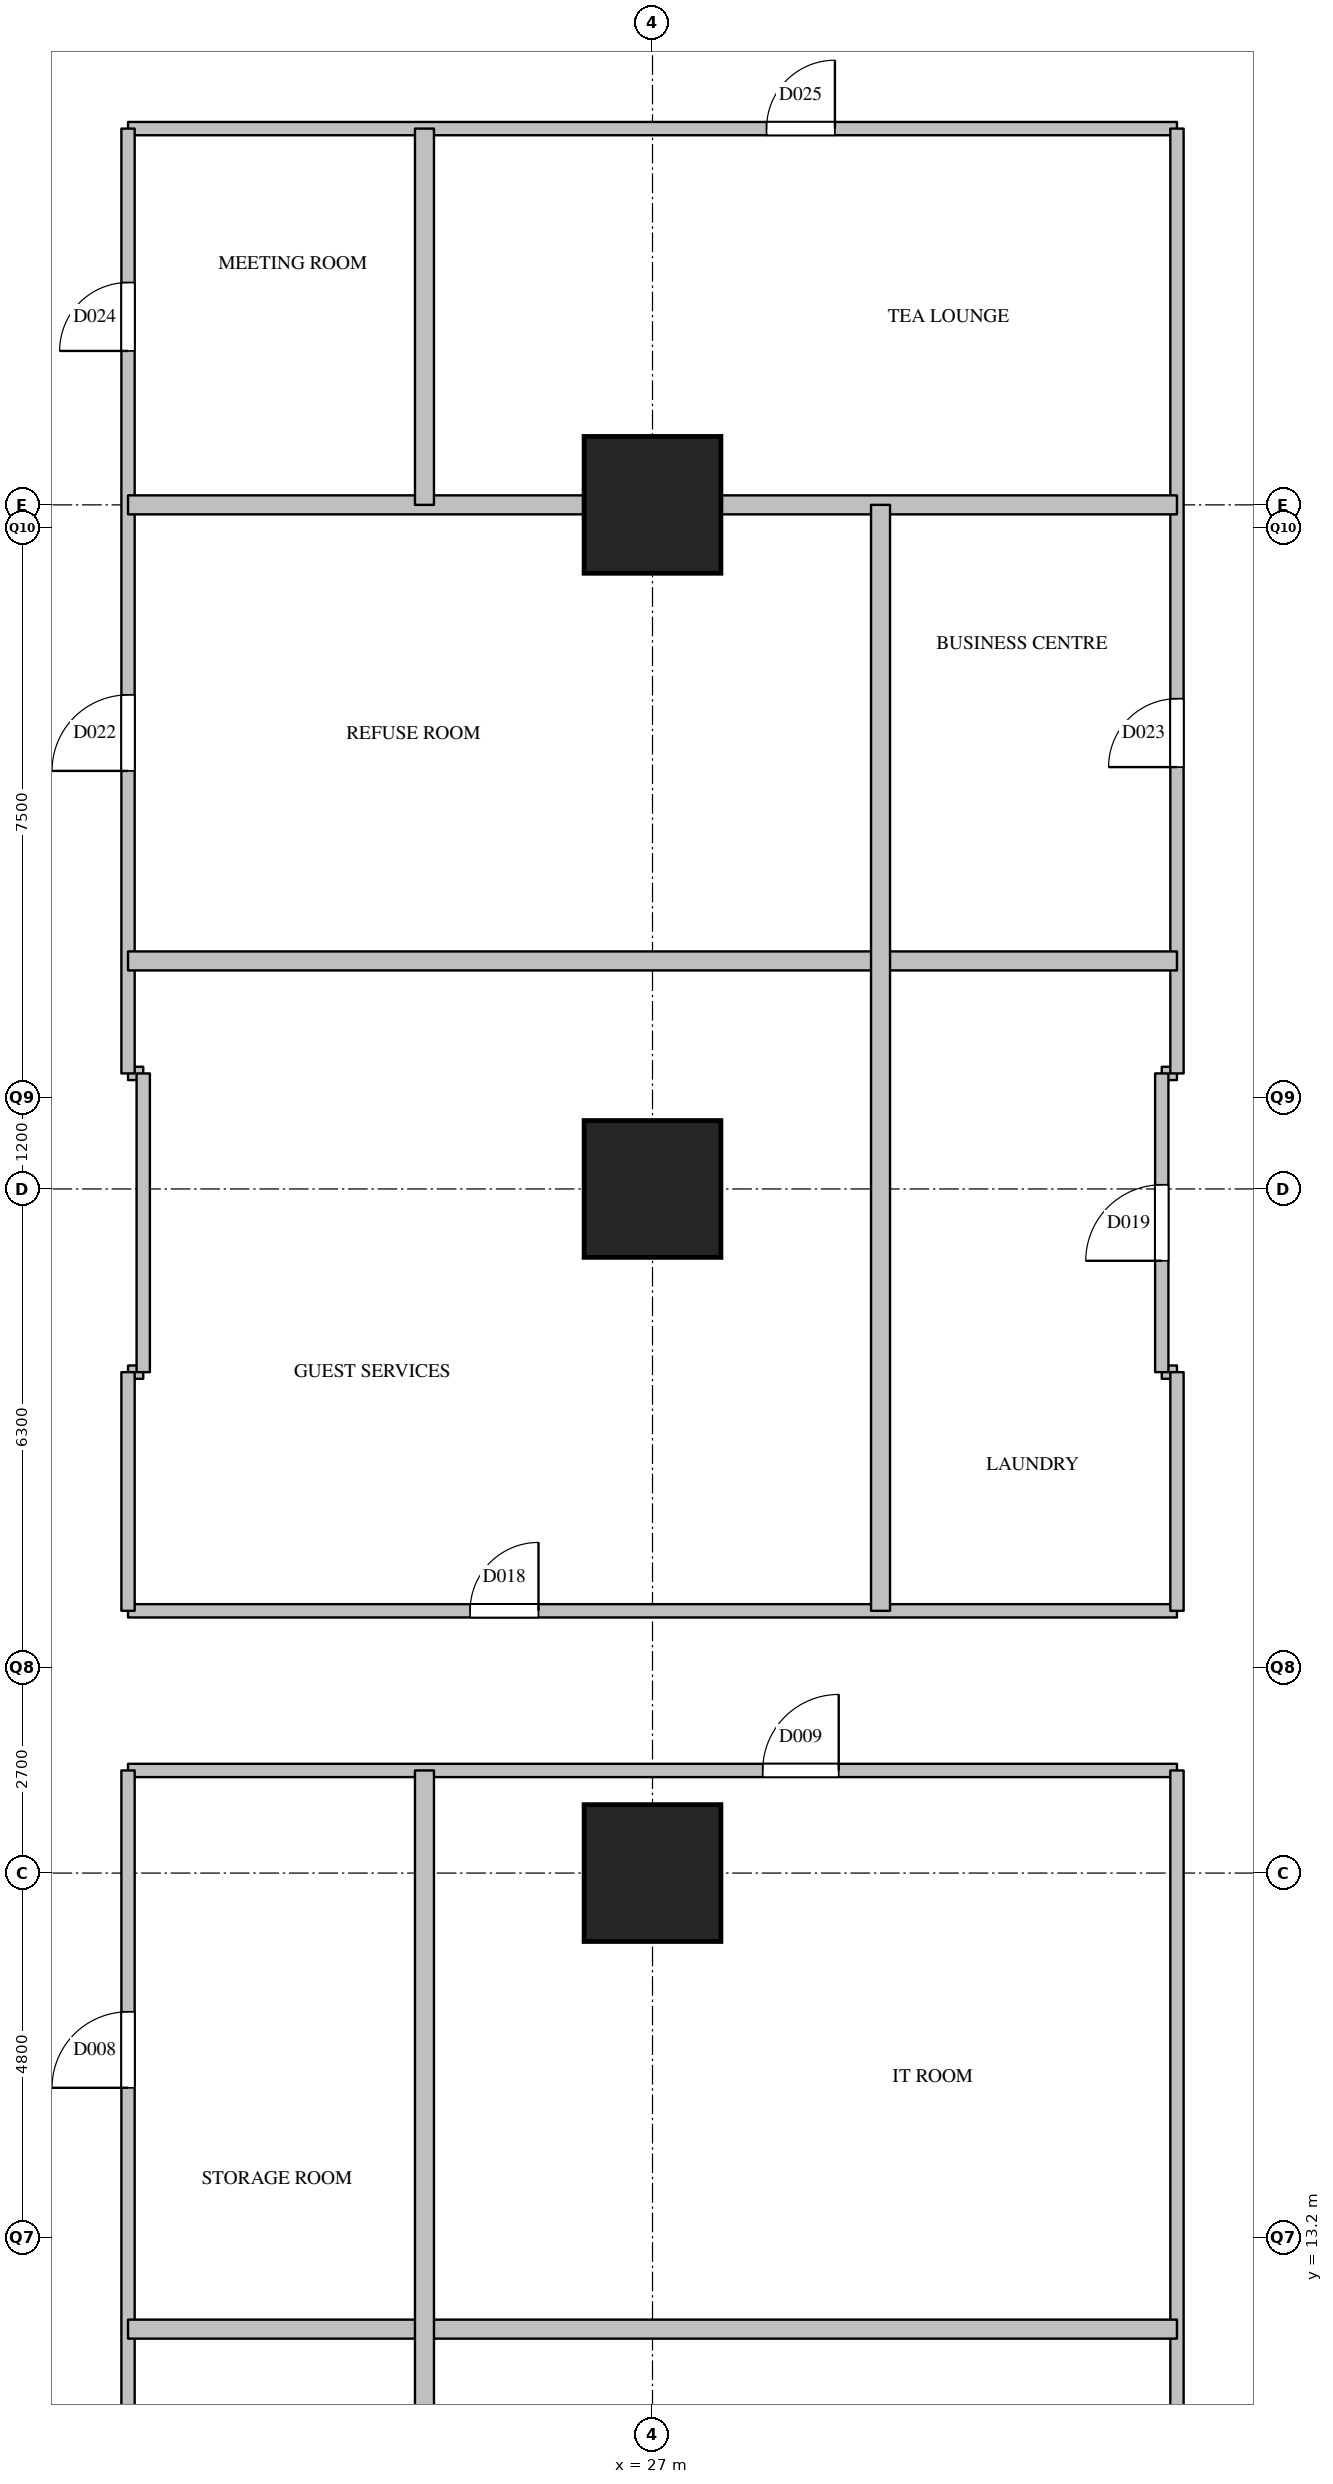
"""IFC4 building model, lengths in metres.
Left out: names, types, materials, properties, quantities, classifications, styles, units other than length and angle.
Written with IfcOpenShell. Run it as: python <this file> out.ifc"""

import sys

from ifc_helpers import new_model, si_unit, direction, frame, frame_2d, origin, origin_2d, place, context, subcontext, project, spatial, rectangle, extrude, element, fill, save


model = new_model("IFC4")
c1 = context("Model", 3, precision=1e-05, world=origin(), true_north=direction((0.0, 1.0)))
c2 = subcontext(c1, "Body", "Model", "MODEL_VIEW")
j1 = project(units=[si_unit("LENGTHUNIT", "METRE"), si_unit("PLANEANGLEUNIT", "RADIAN")], contexts=[c1])
p1 = place(None, origin())
s1 = spatial("IfcSite", under=j1, at=p1, CompositionType="ELEMENT")
p2 = place(p1, origin())
s2 = spatial("IfcBuilding", under=s1, at=p2, CompositionType="ELEMENT")
p3 = place(p2, frame((0.0, 0.0, 46.2)))
s3 = spatial("IfcBuildingStorey", under=s2, at=p3, CompositionType="ELEMENT", Elevation=46.2)
for number, where, z_axis, x_axis in (
    (1, (27.0, 18.0, 0.0), (0.0, 0.0, 1.0), (1.0, 0.0, 0.0)),
    (2, (27.0, 27.0, 0.0), (0.0, 0.0, 1.0), (1.0, 0.0, 0.0)),
    (3, (27.0, 36.0, 0.0), (0.0, 0.0, 1.0), (1.0, 0.0, 0.0)),
):
    element("IfcColumn", number, at=place(p3, frame(where, z_axis=z_axis, x_axis=x_axis)), inside=s3, PredefinedType="COLUMN", context=c2, shape_type="SweptSolid", body=[
        extrude(rectangle(XDim=1.8, YDim=1.8, at=origin_2d()), origin(), (0.0, 0.0, 1.0), 3.8),
    ])
p4 = place(p3, frame((20.1, 19.35, 0.0), z_axis=(0.0, 0.0, 1.0), x_axis=(1.0, 0.0, 0.0)))
e4 = element("IfcWall", 4, at=p4, inside=s3, PredefinedType="PARTITIONING", context=c2, shape_type="SweptSolid", body=[
    extrude(rectangle(XDim=13.8, YDim=0.175, at=frame_2d((6.9, 0.0))), origin(), (0.0, 0.0, 1.0), 2.5),
])
p5 = place(p4, frame((8.35, 0.0, 0.0)))
e5 = element("IfcOpeningElement", 5, at=p5, cuts=e4, PredefinedType="OPENING", context=c2, shape_type="SweptSolid", body=[
    extrude(rectangle(XDim=1.0, YDim=2.1, at=frame_2d((0.5, 1.05))), frame((0.0, 0.097, 0.0), z_axis=(0.0, -1.0, 0.0), x_axis=(1.0, 0.0, 0.0)), (0.0, 0.0, 1.0), 0.195),
])
p6 = place(p3, frame((20.1, 21.45, 0.0), z_axis=(0.0, 0.0, 1.0), x_axis=(1.0, 0.0, 0.0)))
e6 = element("IfcWall", 6, at=p6, inside=s3, PredefinedType="PARTITIONING", context=c2, shape_type="SweptSolid", body=[
    extrude(rectangle(XDim=13.8, YDim=0.175, at=frame_2d((6.9, 0.0))), origin(), (0.0, 0.0, 1.0), 2.5),
])
p7 = place(p6, frame((4.5, 0.0, 0.0)))
e7 = element("IfcOpeningElement", 7, at=p7, cuts=e6, PredefinedType="OPENING", context=c2, shape_type="SweptSolid", body=[
    extrude(rectangle(XDim=0.9, YDim=2.1, at=frame_2d((0.45, 1.05))), frame((0.0, 0.097, 0.0), z_axis=(0.0, -1.0, 0.0), x_axis=(1.0, 0.0, 0.0)), (0.0, 0.0, 1.0), 0.195),
])
for number, where, z_axis, x_axis in (
    (8, (20.1, 24.59, 0.0), (0.0, 0.0, 1.0), (1.0, 0.0, 0.0)),
    (9, (33.7, 24.59, 0.0), (0.0, 0.0, 1.0), (1.0, 0.0, 0.0)),
    (10, (20.1, 28.52, 0.0), (0.0, 0.0, 1.0), (1.0, 0.0, 0.0)),
    (11, (33.7, 28.52, 0.0), (0.0, 0.0, 1.0), (1.0, 0.0, 0.0)),
):
    element("IfcWall", number, at=place(p3, frame(where, z_axis=z_axis, x_axis=x_axis)), inside=s3, PredefinedType="PARTITIONING", context=c2, shape_type="SweptSolid", body=[
        extrude(rectangle(XDim=0.2, YDim=0.175, at=frame_2d((0.1, 0.0))), origin(), (0.0, 0.0, 1.0), 3.5),
    ])
p8 = place(p3, frame((20.1, 40.95, 0.0), z_axis=(0.0, 0.0, 1.0), x_axis=(1.0, 0.0, 0.0)))
e12 = element("IfcWall", 12, at=p8, inside=s3, PredefinedType="PARTITIONING", context=c2, shape_type="SweptSolid", body=[
    extrude(rectangle(XDim=13.8, YDim=0.175, at=frame_2d((6.9, 0.0))), origin(), (0.0, 0.0, 1.0), 2.5),
])
p9 = place(p8, frame((8.4, 0.0, 0.0)))
e13 = element("IfcOpeningElement", 13, at=p9, cuts=e12, PredefinedType="OPENING", context=c2, shape_type="SweptSolid", body=[
    extrude(rectangle(XDim=0.9, YDim=2.1, at=frame_2d((0.45, 1.05))), frame((0.0, 0.097, 0.0), z_axis=(0.0, -1.0, 0.0), x_axis=(1.0, 0.0, 0.0)), (0.0, 0.0, 1.0), 0.195),
])
p10 = place(p3, frame((20.1, 6.9, 0.0), z_axis=(0.0, 0.0, 1.0), x_axis=(0.0, 1.0, 0.0)))
e14 = element("IfcWall", 14, at=p10, inside=s3, PredefinedType="PARTITIONING", context=c2, shape_type="SweptSolid", body=[
    extrude(rectangle(XDim=12.45, YDim=0.175, at=frame_2d((6.225, 0.0))), origin(), (0.0, 0.0, 1.0), 3.5),
])
p11 = place(p10, frame((2.1, 0.0, 0.0)))
e15 = element("IfcOpeningElement", 15, at=p11, cuts=e14, PredefinedType="OPENING", context=c2, shape_type="SweptSolid", body=[
    extrude(rectangle(XDim=0.9, YDim=2.1, at=frame_2d((0.45, 1.05))), frame((0.0, 0.097, 0.0), z_axis=(0.0, -1.0, 0.0), x_axis=(1.0, 0.0, 0.0)), (0.0, 0.0, 1.0), 0.195),
])
p12 = place(p10, frame((8.275, 0.0, 0.0)))
e16 = element("IfcOpeningElement", 16, at=p12, cuts=e14, PredefinedType="OPENING", context=c2, shape_type="SweptSolid", body=[
    extrude(rectangle(XDim=1.0, YDim=2.1, at=frame_2d((0.5, 1.05))), frame((0.0, 0.097, 0.0), z_axis=(0.0, -1.0, 0.0), x_axis=(1.0, 0.0, 0.0)), (0.0, 0.0, 1.0), 0.195),
])
p13 = place(p3, frame((20.1, 21.45, 0.0), z_axis=(0.0, 0.0, 1.0), x_axis=(0.0, 1.0, 0.0)))
e17 = element("IfcWall", 17, at=p13, inside=s3, PredefinedType="PARTITIONING", context=c2, shape_type="SweptSolid", body=[
    extrude(rectangle(XDim=3.14, YDim=0.175, at=frame_2d((1.57, 0.0))), origin(), (0.0, 0.0, 1.0), 3.5),
])
p14 = place(p3, frame((20.1, 28.52, 0.0), z_axis=(0.0, 0.0, 1.0), x_axis=(0.0, 1.0, 0.0)))
e18 = element("IfcWall", 18, at=p14, inside=s3, PredefinedType="PARTITIONING", context=c2, shape_type="SweptSolid", body=[
    extrude(rectangle(XDim=12.43, YDim=0.175, at=frame_2d((6.215, 0.0))), origin(), (0.0, 0.0, 1.0), 3.5),
])
p15 = place(p14, frame((3.98, 0.0, 0.0)))
e19 = element("IfcOpeningElement", 19, at=p15, cuts=e18, PredefinedType="OPENING", context=c2, shape_type="SweptSolid", body=[
    extrude(rectangle(XDim=1.0, YDim=2.1, at=frame_2d((0.5, 1.05))), frame((0.0, 0.097, 0.0), z_axis=(0.0, -1.0, 0.0), x_axis=(1.0, 0.0, 0.0)), (0.0, 0.0, 1.0), 0.195),
])
p16 = place(p14, frame((9.505, 0.0, 0.0)))
e20 = element("IfcOpeningElement", 20, at=p16, cuts=e18, PredefinedType="OPENING", context=c2, shape_type="SweptSolid", body=[
    extrude(rectangle(XDim=0.9, YDim=2.1, at=frame_2d((0.45, 1.05))), frame((0.0, 0.097, 0.0), z_axis=(0.0, -1.0, 0.0), x_axis=(1.0, 0.0, 0.0)), (0.0, 0.0, 1.0), 0.195),
])
p17 = place(p3, frame((20.3, 24.59, 0.0), z_axis=(0.0, 0.0, 1.0), x_axis=(0.0, 1.0, 0.0)))
e21 = element("IfcWall", 21, at=p17, inside=s3, PredefinedType="PARTITIONING", context=c2, shape_type="SweptSolid", body=[
    extrude(rectangle(XDim=3.93, YDim=0.175, at=frame_2d((1.965, 0.0))), origin(), (0.0, 0.0, 1.0), 2.5),
])
p18 = place(p3, frame((33.7, 24.59, 0.0), z_axis=(0.0, 0.0, 1.0), x_axis=(0.0, 1.0, 0.0)))
e22 = element("IfcWall", 22, at=p18, inside=s3, PredefinedType="PARTITIONING", context=c2, shape_type="SweptSolid", body=[
    extrude(rectangle(XDim=3.93, YDim=0.175, at=frame_2d((1.965, 0.0))), origin(), (0.0, 0.0, 1.0), 2.5),
])
p19 = place(p18, frame((1.465, 0.0, 0.0)))
e23 = element("IfcOpeningElement", 23, at=p19, cuts=e22, PredefinedType="OPENING", context=c2, shape_type="SweptSolid", body=[
    extrude(rectangle(XDim=1.0, YDim=2.1, at=frame_2d((0.5, 1.05))), frame((0.0, 0.097, 0.0), z_axis=(0.0, -1.0, 0.0), x_axis=(1.0, 0.0, 0.0)), (0.0, 0.0, 1.0), 0.195),
])
p20 = place(p3, frame((33.9, 6.9, 0.0), z_axis=(0.0, 0.0, 1.0), x_axis=(0.0, 1.0, 0.0)))
e24 = element("IfcWall", 24, at=p20, inside=s3, PredefinedType="PARTITIONING", context=c2, shape_type="SweptSolid", body=[
    extrude(rectangle(XDim=12.45, YDim=0.175, at=frame_2d((6.225, 0.0))), origin(), (0.0, 0.0, 1.0), 3.5),
])
p21 = place(p20, frame((2.1, 0.0, 0.0)))
e25 = element("IfcOpeningElement", 25, at=p21, cuts=e24, PredefinedType="OPENING", context=c2, shape_type="SweptSolid", body=[
    extrude(rectangle(XDim=0.9, YDim=2.1, at=frame_2d((0.45, 1.05))), frame((0.0, 0.097, 0.0), z_axis=(0.0, -1.0, 0.0), x_axis=(1.0, 0.0, 0.0)), (0.0, 0.0, 1.0), 0.195),
])
p22 = place(p3, frame((33.9, 21.45, 0.0), z_axis=(0.0, 0.0, 1.0), x_axis=(0.0, 1.0, 0.0)))
e26 = element("IfcWall", 26, at=p22, inside=s3, PredefinedType="PARTITIONING", context=c2, shape_type="SweptSolid", body=[
    extrude(rectangle(XDim=3.14, YDim=0.175, at=frame_2d((1.57, 0.0))), origin(), (0.0, 0.0, 1.0), 3.5),
])
p23 = place(p3, frame((33.9, 28.52, 0.0), z_axis=(0.0, 0.0, 1.0), x_axis=(0.0, 1.0, 0.0)))
e27 = element("IfcWall", 27, at=p23, inside=s3, PredefinedType="PARTITIONING", context=c2, shape_type="SweptSolid", body=[
    extrude(rectangle(XDim=12.43, YDim=0.175, at=frame_2d((6.215, 0.0))), origin(), (0.0, 0.0, 1.0), 3.5),
])
p24 = place(p23, frame((4.03, 0.0, 0.0)))
e28 = element("IfcOpeningElement", 28, at=p24, cuts=e27, PredefinedType="OPENING", context=c2, shape_type="SweptSolid", body=[
    extrude(rectangle(XDim=0.9, YDim=2.1, at=frame_2d((0.45, 1.05))), frame((0.0, 0.097, 0.0), z_axis=(0.0, -1.0, 0.0), x_axis=(1.0, 0.0, 0.0)), (0.0, 0.0, 1.0), 0.195),
])
for number, where, z_axis, x_axis in (
    (29, (20.1, 12.0, 0.0), (0.0, 0.0, 1.0), (1.0, 0.0, 0.0)),
    (30, (20.1, 30.0, 0.0), (0.0, 0.0, 1.0), (1.0, 0.0, 0.0)),
):
    element("IfcWall", number, at=place(p3, frame(where, z_axis=z_axis, x_axis=x_axis)), inside=s3, PredefinedType="PARTITIONING", context=c2, shape_type="SweptSolid", body=[
        extrude(rectangle(XDim=13.8, YDim=0.25, at=frame_2d((6.9, 0.0))), origin(), (0.0, 0.0, 1.0), 2.5),
    ])
p25 = place(p3, frame((20.1, 36.0, 0.0), z_axis=(0.0, 0.0, 1.0), x_axis=(1.0, 0.0, 0.0)))
e31 = element("IfcWall", 31, at=p25, inside=s3, PredefinedType="PARTITIONING", context=c2, shape_type="SweptSolid", body=[
    extrude(rectangle(XDim=13.8, YDim=0.25, at=frame_2d((6.9, 0.0))), origin(), (0.0, 0.0, 1.0), 3.5),
])
p26 = place(p3, frame((24.0, 5.875, 0.0), z_axis=(0.0, 0.0, 1.0), x_axis=(0.0, 1.0, 0.0)))
e32 = element("IfcWall", 32, at=p26, inside=s3, PredefinedType="PARTITIONING", context=c2, shape_type="SweptSolid", body=[
    extrude(rectangle(XDim=13.475, YDim=0.25, at=frame_2d((6.738, 0.0))), origin(), (0.0, 0.0, 1.0), 3.5),
])
p27 = place(p3, frame((24.0, 36.0, 0.0), z_axis=(0.0, 0.0, 1.0), x_axis=(0.0, 1.0, 0.0)))
e33 = element("IfcWall", 33, at=p27, inside=s3, PredefinedType="PARTITIONING", context=c2, shape_type="SweptSolid", body=[
    extrude(rectangle(XDim=4.95, YDim=0.25, at=frame_2d((2.475, 0.0))), origin(), (0.0, 0.0, 1.0), 3.5),
])
p28 = place(p3, frame((30.0, 21.45, 0.0), z_axis=(0.0, 0.0, 1.0), x_axis=(0.0, 1.0, 0.0)))
e34 = element("IfcWall", 34, at=p28, inside=s3, PredefinedType="PARTITIONING", context=c2, shape_type="SweptSolid", body=[
    extrude(rectangle(XDim=14.55, YDim=0.25, at=frame_2d((7.275, 0.0))), origin(), (0.0, 0.0, 1.0), 2.5),
])
p29 = place(p12, origin())
e35 = element("IfcDoor", 35, at=p29, inside=s3, OperationType="SINGLE_SWING_LEFT", PredefinedType="DOOR", context=c2, shape_type="SweptSolid", body=[
    extrude(rectangle(XDim=1.0, YDim=2.1, at=frame_2d((0.5, 1.05))), frame((0.0, 0.025, 0.0), z_axis=(0.0, -1.0, 0.0), x_axis=(1.0, 0.0, 0.0)), (0.0, 0.0, 1.0), 0.05),
])
fill(e16, e35)
p30 = place(p5, origin())
e36 = element("IfcDoor", 36, at=p30, inside=s3, OperationType="SINGLE_SWING_RIGHT", PredefinedType="DOOR", context=c2, shape_type="SweptSolid", body=[
    extrude(rectangle(XDim=1.0, YDim=2.1, at=frame_2d((0.5, 1.05))), frame((0.0, 0.025, 0.0), z_axis=(0.0, -1.0, 0.0), x_axis=(1.0, 0.0, 0.0)), (0.0, 0.0, 1.0), 0.05),
])
fill(e5, e36)
p31 = place(p7, origin())
e37 = element("IfcDoor", 37, at=p31, inside=s3, OperationType="SINGLE_SWING_RIGHT", PredefinedType="DOOR", context=c2, shape_type="SweptSolid", body=[
    extrude(rectangle(XDim=0.9, YDim=2.1, at=frame_2d((0.45, 1.05))), frame((0.0, 0.025, 0.0), z_axis=(0.0, -1.0, 0.0), x_axis=(1.0, 0.0, 0.0)), (0.0, 0.0, 1.0), 0.05),
])
fill(e7, e37)
p32 = place(p19, origin())
e38 = element("IfcDoor", 38, at=p32, inside=s3, OperationType="SINGLE_SWING_LEFT", PredefinedType="DOOR", context=c2, shape_type="SweptSolid", body=[
    extrude(rectangle(XDim=1.0, YDim=2.1, at=frame_2d((0.5, 1.05))), frame((0.0, 0.025, 0.0), z_axis=(0.0, -1.0, 0.0), x_axis=(1.0, 0.0, 0.0)), (0.0, 0.0, 1.0), 0.05),
])
fill(e23, e38)
p33 = place(p15, origin())
e39 = element("IfcDoor", 39, at=p33, inside=s3, OperationType="SINGLE_SWING_LEFT", PredefinedType="DOOR", context=c2, shape_type="SweptSolid", body=[
    extrude(rectangle(XDim=1.0, YDim=2.1, at=frame_2d((0.5, 1.05))), frame((0.0, 0.025, 0.0), z_axis=(0.0, -1.0, 0.0), x_axis=(1.0, 0.0, 0.0)), (0.0, 0.0, 1.0), 0.05),
])
fill(e19, e39)
p34 = place(p24, origin())
e40 = element("IfcDoor", 40, at=p34, inside=s3, OperationType="SINGLE_SWING_LEFT", PredefinedType="DOOR", context=c2, shape_type="SweptSolid", body=[
    extrude(rectangle(XDim=0.9, YDim=2.1, at=frame_2d((0.45, 1.05))), frame((0.0, 0.025, 0.0), z_axis=(0.0, -1.0, 0.0), x_axis=(1.0, 0.0, 0.0)), (0.0, 0.0, 1.0), 0.05),
])
fill(e28, e40)
p35 = place(p16, origin())
e41 = element("IfcDoor", 41, at=p35, inside=s3, OperationType="SINGLE_SWING_LEFT", PredefinedType="DOOR", context=c2, shape_type="SweptSolid", body=[
    extrude(rectangle(XDim=0.9, YDim=2.1, at=frame_2d((0.45, 1.05))), frame((0.0, 0.025, 0.0), z_axis=(0.0, -1.0, 0.0), x_axis=(1.0, 0.0, 0.0)), (0.0, 0.0, 1.0), 0.05),
])
fill(e20, e41)
p36 = place(p9, origin())
e42 = element("IfcDoor", 42, at=p36, inside=s3, OperationType="SINGLE_SWING_RIGHT", PredefinedType="DOOR", context=c2, shape_type="SweptSolid", body=[
    extrude(rectangle(XDim=0.9, YDim=2.1, at=frame_2d((0.45, 1.05))), frame((0.0, 0.025, 0.0), z_axis=(0.0, -1.0, 0.0), x_axis=(1.0, 0.0, 0.0)), (0.0, 0.0, 1.0), 0.05),
])
fill(e13, e42)
save(model, sys.argv[1])
